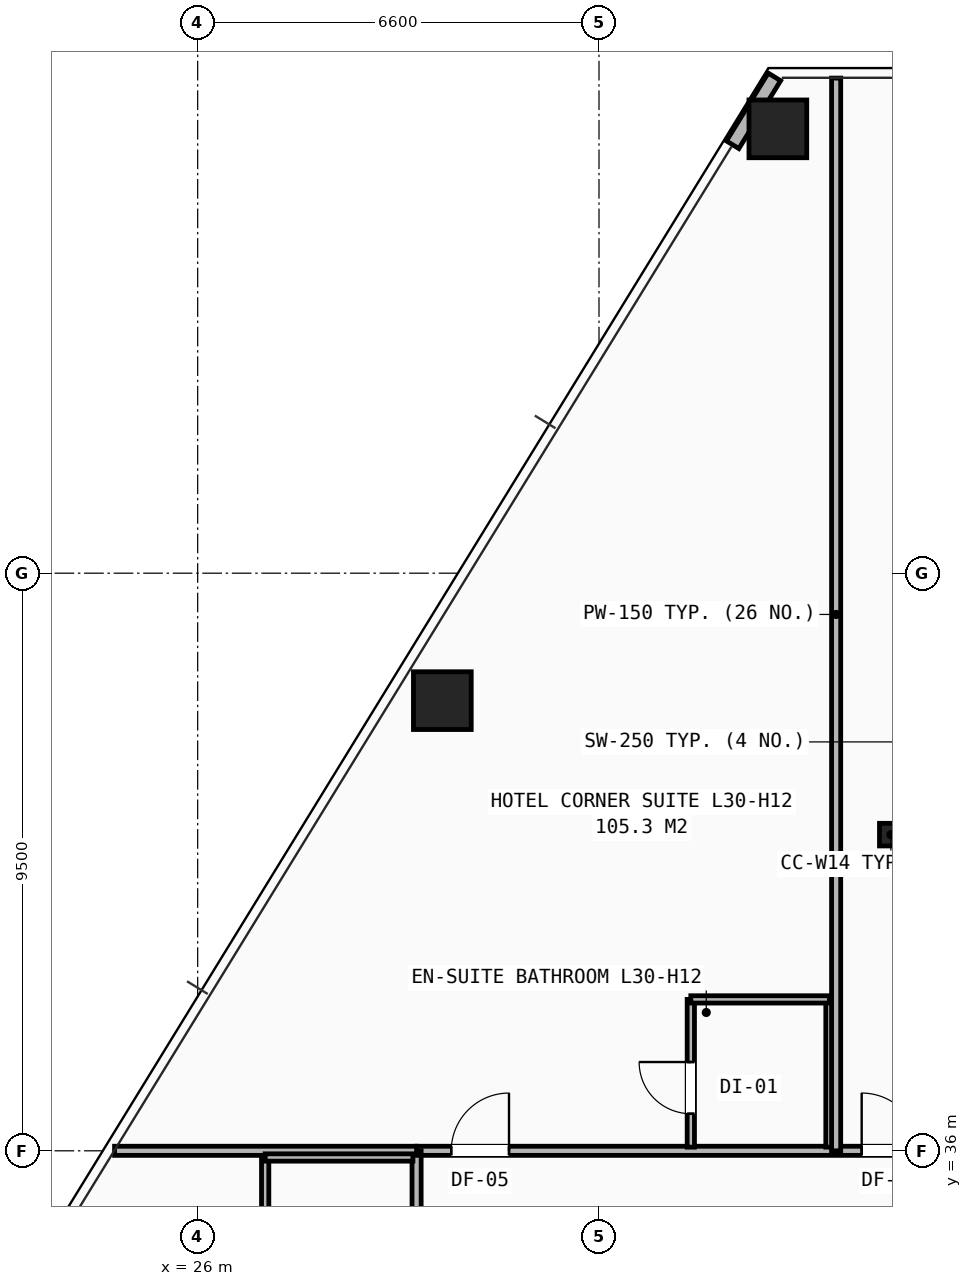
"""IFC4 building model, lengths in metres.
Left out: names, types, materials, properties, quantities, classifications, styles, units other than length and angle.
Written with IfcOpenShell. Run it as: python <this file> out.ifc"""

import sys

from ifc_helpers import new_model, si_unit, direction, frame, frame_2d, origin, origin_2d, place, context, subcontext, project, spatial, rectangle, hollow_rectangle, i_section, extrude, element, fill, save


model = new_model("IFC4")
c1 = context("Model", 3, precision=1e-05, world=origin(), true_north=direction((0.0, 1.0)))
c2 = subcontext(c1, "Body", "Model", "MODEL_VIEW")
j1 = project(units=[si_unit("LENGTHUNIT", "METRE"), si_unit("PLANEANGLEUNIT", "RADIAN")], contexts=[c1])
p1 = place(None, origin())
s1 = spatial("IfcSite", under=j1, at=p1, CompositionType="ELEMENT")
p2 = place(p1, origin())
s2 = spatial("IfcBuilding", under=s1, at=p2, CompositionType="ELEMENT")
p3 = place(p2, frame((0.0, 0.0, 105.4)))
s3 = spatial("IfcBuildingStorey", under=s2, at=p3, CompositionType="ELEMENT", Elevation=105.4)
p4 = place(p3, frame((37.4, 41.2, 0.0), z_axis=(0.0, 0.0, 1.0), x_axis=(1.0, 0.0, 0.0)))
e1 = element("IfcColumn", 1, at=p4, inside=s3, PredefinedType="COLUMN", context=c2, shape_type="SweptSolid", body=[
    extrude(i_section(OverallWidth=0.374, OverallDepth=0.372, WebThickness=0.016, FlangeThickness=0.026, at=origin_2d()), origin(), (0.0, 0.0, 1.0), 3.2),
])
for number, where, z_axis, x_axis in (
    (2, (35.542, 52.808, 0.0), (0.0, 0.0, 1.0), (1.0, 0.0, 0.0)),
    (3, (30.023, 43.404, 0.0), (0.0, 0.0, 1.0), (1.0, 0.0, 0.0)),
):
    element("IfcColumn", number, at=place(p3, frame(where, z_axis=z_axis, x_axis=x_axis)), inside=s3, PredefinedType="COLUMN", context=c2, shape_type="SweptSolid", body=[
        extrude(hollow_rectangle(XDim=0.95, YDim=0.95, WallThickness=0.065, at=origin_2d()), origin(), (0.0, 0.0, 1.0), 3.2),
    ])
p5 = place(p3, frame((35.484, 53.663, 0.0), z_axis=(0.0, 0.0, 1.0), x_axis=(-0.523671203533, -0.851920460248, 0.0)))
e4 = element("IfcWall", 4, at=p5, inside=s3, PredefinedType="SHEAR", context=c2, shape_type="SweptSolid", body=[
    extrude(rectangle(XDim=1.311, YDim=0.24, at=frame_2d((0.655, 0.0))), origin(), (0.0, 0.0, 1.0), 2.253),
])
p6 = place(p3, frame((29.6, 36.0, 0.0), z_axis=(0.0, 0.0, 1.0), x_axis=(1.0, 0.0, 0.0)))
e5 = element("IfcWall", 5, at=p6, inside=s3, PredefinedType="PARTITIONING", context=c2, shape_type="SweptSolid", body=[
    extrude(rectangle(XDim=9.65, YDim=0.15, at=frame_2d((4.825, 0.0))), origin(), (0.0, 0.0, 1.0), 2.503),
])
p7 = place(p6, frame((0.57, 0.0, 0.0)))
e6 = element("IfcOpeningElement", 6, at=p7, cuts=e5, PredefinedType="OPENING", context=c2, shape_type="SweptSolid", body=[
    extrude(rectangle(XDim=0.95, YDim=2.1, at=frame_2d((0.475, 1.05))), frame((0.0, 0.085, 0.0), z_axis=(0.0, -1.0, 0.0), x_axis=(1.0, 0.0, 0.0)), (0.0, 0.0, 1.0), 0.17),
])
p8 = place(p6, frame((7.32, 0.0, 0.0)))
e7 = element("IfcOpeningElement", 7, at=p8, cuts=e5, PredefinedType="OPENING", context=c2, shape_type="SweptSolid", body=[
    extrude(rectangle(XDim=0.95, YDim=2.1, at=frame_2d((0.475, 1.05))), frame((0.0, 0.085, 0.0), z_axis=(0.0, -1.0, 0.0), x_axis=(1.0, 0.0, 0.0)), (0.0, 0.0, 1.0), 0.17),
])
p9 = place(p3, frame((29.6, 14.1, 0.0), z_axis=(0.0, 0.0, 1.0), x_axis=(0.0, 1.0, 0.0)))
e8 = element("IfcWall", 8, at=p9, inside=s3, PredefinedType="PARTITIONING", context=c2, shape_type="SweptSolid", body=[
    extrude(rectangle(XDim=21.9, YDim=0.15, at=frame_2d((10.95, 0.0))), origin(), (0.0, 0.0, 1.0), 2.421),
])
p10 = place(p9, frame((0.42, 0.0, 0.0)))
e9 = element("IfcOpeningElement", 9, at=p10, cuts=e8, PredefinedType="OPENING", context=c2, shape_type="SweptSolid", body=[
    extrude(rectangle(XDim=0.95, YDim=2.1, at=frame_2d((0.475, 1.05))), frame((0.0, 0.085, 0.0), z_axis=(0.0, -1.0, 0.0), x_axis=(1.0, 0.0, 0.0)), (0.0, 0.0, 1.0), 0.17),
])
p11 = place(p9, frame((5.12, 0.0, 0.0)))
e10 = element("IfcOpeningElement", 10, at=p11, cuts=e8, PredefinedType="OPENING", context=c2, shape_type="SweptSolid", body=[
    extrude(rectangle(XDim=0.95, YDim=2.1, at=frame_2d((0.475, 1.05))), frame((0.0, 0.085, 0.0), z_axis=(0.0, -1.0, 0.0), x_axis=(1.0, 0.0, 0.0)), (0.0, 0.0, 1.0), 0.17),
])
p12 = place(p9, frame((10.32, 0.0, 0.0)))
e11 = element("IfcOpeningElement", 11, at=p12, cuts=e8, PredefinedType="OPENING", context=c2, shape_type="SweptSolid", body=[
    extrude(rectangle(XDim=0.95, YDim=2.1, at=frame_2d((0.475, 1.05))), frame((0.0, 0.085, 0.0), z_axis=(0.0, -1.0, 0.0), x_axis=(1.0, 0.0, 0.0)), (0.0, 0.0, 1.0), 0.17),
])
p13 = place(p9, frame((16.12, 0.0, 0.0)))
e12 = element("IfcOpeningElement", 12, at=p13, cuts=e8, PredefinedType="OPENING", context=c2, shape_type="SweptSolid", body=[
    extrude(rectangle(XDim=0.95, YDim=2.1, at=frame_2d((0.475, 1.05))), frame((0.0, 0.085, 0.0), z_axis=(0.0, -1.0, 0.0), x_axis=(1.0, 0.0, 0.0)), (0.0, 0.0, 1.0), 0.17),
])
p14 = place(p3, frame((24.633, 36.0, 0.0), z_axis=(0.0, 0.0, 1.0), x_axis=(1.0, 0.0, 0.0)))
e13 = element("IfcWall", 13, at=p14, inside=s3, PredefinedType="PARTITIONING", context=c2, shape_type="SweptSolid", body=[
    extrude(rectangle(XDim=4.967, YDim=0.15, at=frame_2d((2.483, 0.0))), origin(), (0.0, 0.0, 1.0), 2.258),
])
p15 = place(p3, frame((27.11, 33.61, 0.0), z_axis=(0.0, 0.0, 1.0), x_axis=(0.0, 1.0, 0.0)))
e14 = element("IfcWall", 14, at=p15, inside=s3, PredefinedType="PARTITIONING", context=c2, shape_type="SweptSolid", body=[
    extrude(rectangle(XDim=2.28, YDim=0.12, at=frame_2d((1.14, 0.0))), origin(), (0.0, 0.0, 1.0), 2.97),
])
p16 = place(p3, frame((27.11, 35.89, 0.0), z_axis=(0.0, 0.0, 1.0), x_axis=(1.0, 0.0, 0.0)))
e15 = element("IfcWall", 15, at=p16, inside=s3, PredefinedType="PARTITIONING", context=c2, shape_type="SweptSolid", body=[
    extrude(rectangle(XDim=2.43, YDim=0.12, at=frame_2d((1.215, 0.0))), origin(), (0.0, 0.0, 1.0), 2.503),
])
p17 = place(p3, frame((34.11, 36.06, 0.0), z_axis=(0.0, 0.0, 1.0), x_axis=(0.0, 1.0, 0.0)))
e16 = element("IfcWall", 16, at=p17, inside=s3, PredefinedType="PARTITIONING", context=c2, shape_type="SweptSolid", body=[
    extrude(rectangle(XDim=2.43, YDim=0.12, at=frame_2d((1.215, 0.0))), origin(), (0.0, 0.0, 1.0), 2.97),
])
p18 = place(p17, frame((0.55, 0.0, 0.0)))
e17 = element("IfcOpeningElement", 17, at=p18, cuts=e16, PredefinedType="OPENING", context=c2, shape_type="SweptSolid", body=[
    extrude(rectangle(XDim=0.85, YDim=2.05, at=frame_2d((0.425, 1.025))), frame((0.0, 0.07, 0.0), z_axis=(0.0, -1.0, 0.0), x_axis=(1.0, 0.0, 0.0)), (0.0, 0.0, 1.0), 0.14),
])
p19 = place(p3, frame((36.39, 36.06, 0.0), z_axis=(0.0, 0.0, 1.0), x_axis=(0.0, 1.0, 0.0)))
e18 = element("IfcWall", 18, at=p19, inside=s3, PredefinedType="PARTITIONING", context=c2, shape_type="SweptSolid", body=[
    extrude(rectangle(XDim=2.43, YDim=0.12, at=frame_2d((1.215, 0.0))), origin(), (0.0, 0.0, 1.0), 2.97),
])
p20 = place(p3, frame((34.11, 38.49, 0.0), z_axis=(0.0, 0.0, 1.0), x_axis=(1.0, 0.0, 0.0)))
e19 = element("IfcWall", 19, at=p20, inside=s3, PredefinedType="PARTITIONING", context=c2, shape_type="SweptSolid", body=[
    extrude(rectangle(XDim=2.28, YDim=0.12, at=frame_2d((1.14, 0.0))), origin(), (0.0, 0.0, 1.0), 2.97),
])
p21 = place(p3, frame((36.5, 36.0, 0.0), z_axis=(0.0, 0.0, 1.0), x_axis=(0.0, 1.0, 0.0)))
e20 = element("IfcWall", 20, at=p21, inside=s3, PredefinedType="PARTITIONING", context=c2, shape_type="SweptSolid", body=[
    extrude(rectangle(XDim=17.643, YDim=0.15, at=frame_2d((8.821, 0.0))), origin(), (0.0, 0.0, 1.0), 2.258),
])
p22 = place(p7, origin())
e21 = element("IfcDoor", 21, at=p22, inside=s3, OperationType="SINGLE_SWING_RIGHT", PredefinedType="DOOR", context=c2, shape_type="SweptSolid", body=[
    extrude(rectangle(XDim=0.95, YDim=2.1, at=frame_2d((0.475, 1.05))), frame((0.0, 0.025, 0.0), z_axis=(0.0, -1.0, 0.0), x_axis=(1.0, 0.0, 0.0)), (0.0, 0.0, 1.0), 0.05),
])
fill(e6, e21)
p23 = place(p18, origin())
e22 = element("IfcDoor", 22, at=p23, inside=s3, OperationType="SINGLE_SWING_RIGHT", PredefinedType="DOOR", context=c2, shape_type="SweptSolid", body=[
    extrude(rectangle(XDim=0.85, YDim=2.05, at=frame_2d((0.425, 1.025))), frame((0.0, 0.025, 0.0), z_axis=(0.0, -1.0, 0.0), x_axis=(1.0, 0.0, 0.0)), (0.0, 0.0, 1.0), 0.05),
])
fill(e17, e22)
p24 = place(p8, origin())
e23 = element("IfcDoor", 23, at=p24, inside=s3, OperationType="SINGLE_SWING_LEFT", PredefinedType="DOOR", context=c2, shape_type="SweptSolid", body=[
    extrude(rectangle(XDim=0.95, YDim=2.1, at=frame_2d((0.475, 1.05))), frame((0.0, 0.025, 0.0), z_axis=(0.0, -1.0, 0.0), x_axis=(1.0, 0.0, 0.0)), (0.0, 0.0, 1.0), 0.05),
])
fill(e7, e23)
save(model, sys.argv[1])
